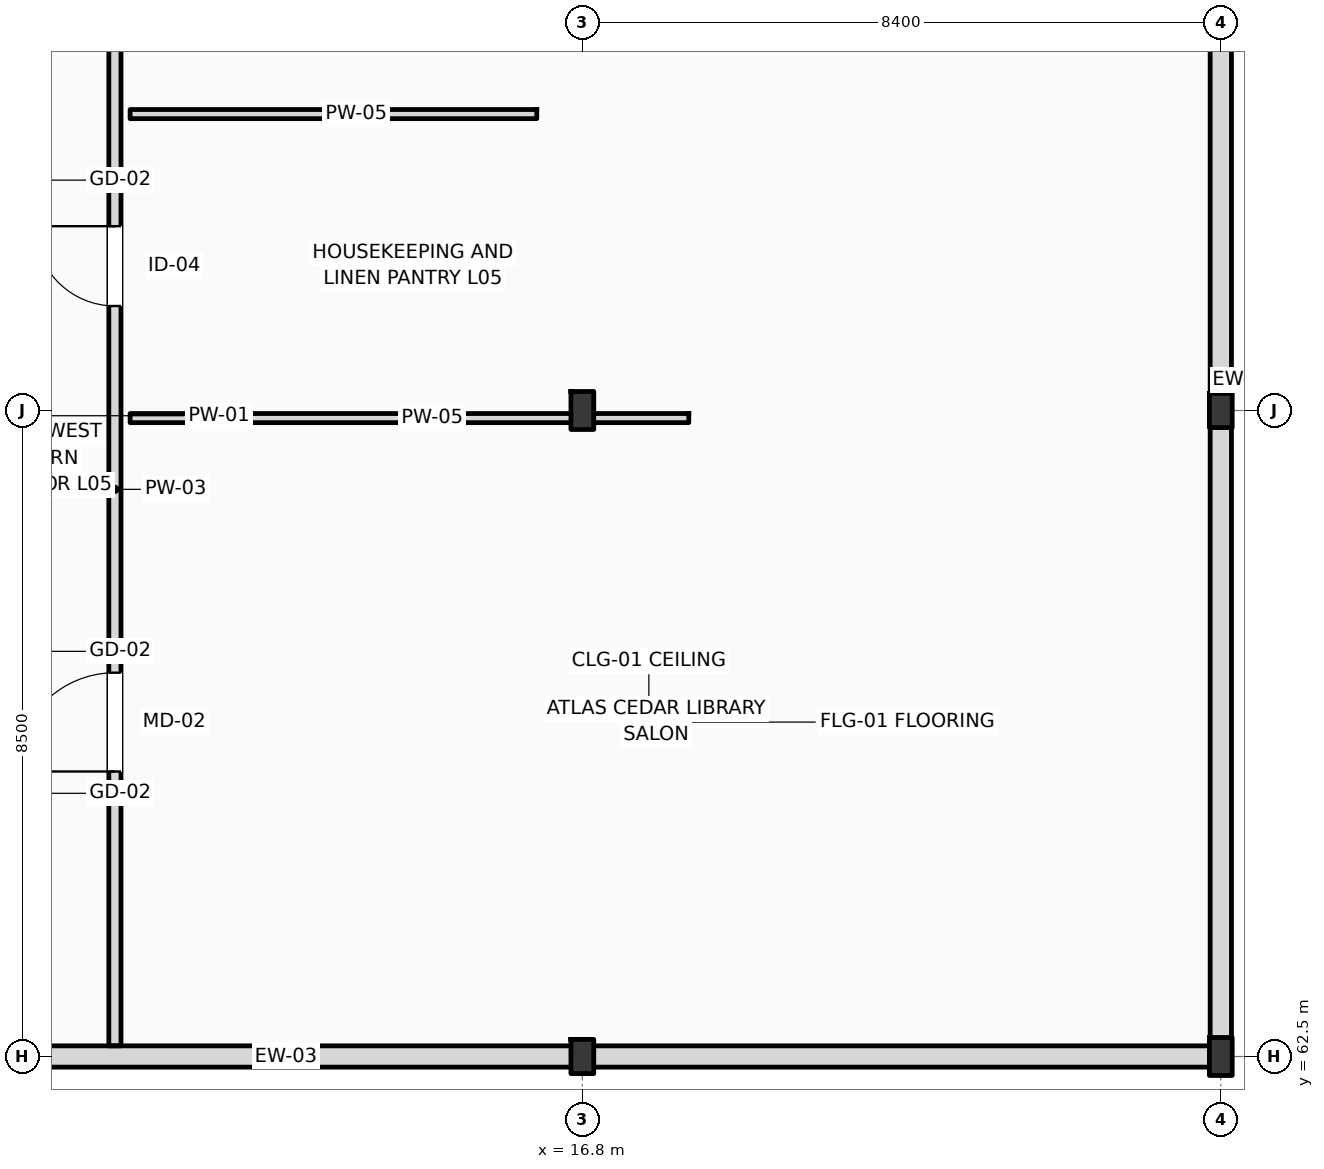
"""IFC4 building model, lengths in metres.
Left out: names, types, materials, properties, quantities, classifications, styles, units other than length and angle.
Written with IfcOpenShell. Run it as: python <this file> out.ifc"""

import sys

from ifc_helpers import new_model, si_unit, direction, frame, frame_2d, origin, origin_2d, place, context, subcontext, project, spatial, rectangle, i_section, extrude, element, fill, save


model = new_model("IFC4")
c1 = context("Model", 3, precision=1e-05, world=origin(), true_north=direction((0.0, 1.0)))
c2 = subcontext(c1, "Body", "Model", "MODEL_VIEW")
j1 = project(units=[si_unit("LENGTHUNIT", "METRE"), si_unit("PLANEANGLEUNIT", "RADIAN")], contexts=[c1])
p1 = place(None, origin())
s1 = spatial("IfcSite", under=j1, at=p1, CompositionType="ELEMENT")
p2 = place(p1, origin())
s2 = spatial("IfcBuilding", under=s1, at=p2, CompositionType="ELEMENT")
p3 = place(p2, frame((0.0, 0.0, 24.6)))
s3 = spatial("IfcBuildingStorey", under=s2, at=p3, CompositionType="ELEMENT", Elevation=24.6)
p4 = place(p3, frame((16.8, 62.5, 0.0), z_axis=(0.0, 0.0, 1.0), x_axis=(1.0, 0.0, 0.0)))
e1 = element("IfcColumn", 1, at=p4, inside=s3, PredefinedType="COLUMN", context=c2, shape_type="SweptSolid", body=[
    extrude(i_section(OverallWidth=0.3, OverallDepth=0.45, WebThickness=0.014, FlangeThickness=0.026, FilletRadius=0.027, at=origin_2d()), origin(), (0.0, 0.0, 1.0), 3.6),
])
for number, where, z_axis, x_axis in (
    (2, (16.8, 71.0, 0.0), (0.0, 0.0, 1.0), (1.0, 0.0, 0.0)),
    (3, (25.2, 62.5, 0.0), (0.0, 0.0, 1.0), (1.0, 0.0, 0.0)),
):
    element("IfcColumn", number, at=place(p3, frame(where, z_axis=z_axis, x_axis=x_axis)), inside=s3, PredefinedType="COLUMN", context=c2, shape_type="SweptSolid", body=[
        extrude(i_section(OverallWidth=0.3, OverallDepth=0.5, WebThickness=0.014, FlangeThickness=0.028, FilletRadius=0.027, at=origin_2d()), origin(), (0.0, 0.0, 1.0), 3.6),
    ])
p5 = place(p3, frame((25.2, 71.0, 0.0), z_axis=(0.0, 0.0, 1.0), x_axis=(1.0, 0.0, 0.0)))
e4 = element("IfcColumn", 4, at=p5, inside=s3, PredefinedType="COLUMN", context=c2, shape_type="SweptSolid", body=[
    extrude(i_section(OverallWidth=0.3, OverallDepth=0.45, WebThickness=0.014, FlangeThickness=0.026, FilletRadius=0.027, at=origin_2d()), origin(), (0.0, 0.0, 1.0), 3.6),
])
p6 = place(p3, frame((0.0, 62.5, 0.0), z_axis=(0.0, 0.0, 1.0), x_axis=(1.0, 0.0, 0.0)))
e5 = element("IfcWall", 5, at=p6, inside=s3, PredefinedType="STANDARD", context=c2, shape_type="SweptSolid", body=[
    extrude(rectangle(XDim=25.2, YDim=0.28, at=frame_2d((12.6, 0.0))), origin(), (0.0, 0.0, 1.0), 2.78),
])
p7 = place(p3, frame((25.2, 62.5, 0.0), z_axis=(0.0, 0.0, 1.0), x_axis=(0.0, 1.0, 0.0)))
e6 = element("IfcWall", 6, at=p7, inside=s3, PredefinedType="STANDARD", context=c2, shape_type="SweptSolid", body=[
    extrude(rectangle(XDim=17.0, YDim=0.28, at=frame_2d((8.5, 0.0))), origin(), (0.0, 0.0, 1.0), 2.93),
])
p8 = place(p3, frame((10.65, 62.64, 0.0), z_axis=(0.0, 0.0, 1.0), x_axis=(0.0, 1.0, 0.0)))
e7 = element("IfcWall", 7, at=p8, inside=s3, PredefinedType="PARTITIONING", context=c2, shape_type="SweptSolid", body=[
    extrude(rectangle(XDim=16.31, YDim=0.16, at=frame_2d((8.155, 0.0))), origin(), (0.0, 0.0, 1.0), 3.34),
])
p9 = place(p8, frame((3.61, 0.0, 0.0)))
e8 = element("IfcOpeningElement", 8, at=p9, cuts=e7, PredefinedType="OPENING", context=c2, shape_type="SweptSolid", body=[
    extrude(rectangle(XDim=1.3, YDim=2.2, at=frame_2d((0.65, 1.1))), frame((0.0, 0.09, 0.0), z_axis=(0.0, -1.0, 0.0), x_axis=(1.0, 0.0, 0.0)), (0.0, 0.0, 1.0), 0.18),
])
p10 = place(p8, frame((9.735, 0.0, 0.0)))
e9 = element("IfcOpeningElement", 9, at=p10, cuts=e7, PredefinedType="OPENING", context=c2, shape_type="SweptSolid", body=[
    extrude(rectangle(XDim=1.05, YDim=2.12, at=frame_2d((0.525, 1.06))), frame((0.0, 0.09, 0.0), z_axis=(0.0, -1.0, 0.0), x_axis=(1.0, 0.0, 0.0)), (0.0, 0.0, 1.0), 0.18),
])
p11 = place(p8, frame((13.49, 0.0, 0.0)))
e10 = element("IfcOpeningElement", 10, at=p11, cuts=e7, PredefinedType="OPENING", context=c2, shape_type="SweptSolid", body=[
    extrude(rectangle(XDim=0.94, YDim=2.15, at=frame_2d((0.47, 1.075))), frame((0.0, 0.09, 0.0), z_axis=(0.0, -1.0, 0.0), x_axis=(1.0, 0.0, 0.0)), (0.0, 0.0, 1.0), 0.18),
])
p12 = place(p3, frame((10.85, 70.9, 0.0), z_axis=(0.0, 0.0, 1.0), x_axis=(1.0, 0.0, 0.0)))
e11 = element("IfcWall", 11, at=p12, inside=s3, PredefinedType="PARTITIONING", context=c2, shape_type="SweptSolid", body=[
    extrude(rectangle(XDim=7.35, YDim=0.12, at=frame_2d((3.675, 0.0))), origin(), (0.0, 0.0, 1.0), 2.78),
])
p13 = place(p3, frame((10.85, 74.9, 0.0), z_axis=(0.0, 0.0, 1.0), x_axis=(1.0, 0.0, 0.0)))
e12 = element("IfcWall", 12, at=p13, inside=s3, PredefinedType="PARTITIONING", context=c2, shape_type="SweptSolid", body=[
    extrude(rectangle(XDim=5.35, YDim=0.12, at=frame_2d((2.675, 0.0))), origin(), (0.0, 0.0, 1.0), 3.34),
])
p14 = place(p9, origin())
e13 = element("IfcDoor", 13, at=p14, inside=s3, OperationType="SINGLE_SWING_LEFT", PredefinedType="DOOR", context=c2, shape_type="SweptSolid", body=[
    extrude(rectangle(XDim=1.3, YDim=2.2, at=frame_2d((0.65, 1.1))), frame((0.0, 0.025, 0.0), z_axis=(0.0, -1.0, 0.0), x_axis=(1.0, 0.0, 0.0)), (0.0, 0.0, 1.0), 0.05),
])
fill(e8, e13)
p15 = place(p10, origin())
e14 = element("IfcDoor", 14, at=p15, inside=s3, OperationType="SINGLE_SWING_RIGHT", PredefinedType="DOOR", context=c2, shape_type="SweptSolid", body=[
    extrude(rectangle(XDim=1.05, YDim=2.12, at=frame_2d((0.525, 1.06))), frame((0.0, 0.025, 0.0), z_axis=(0.0, -1.0, 0.0), x_axis=(1.0, 0.0, 0.0)), (0.0, 0.0, 1.0), 0.05),
])
fill(e9, e14)
save(model, sys.argv[1])
